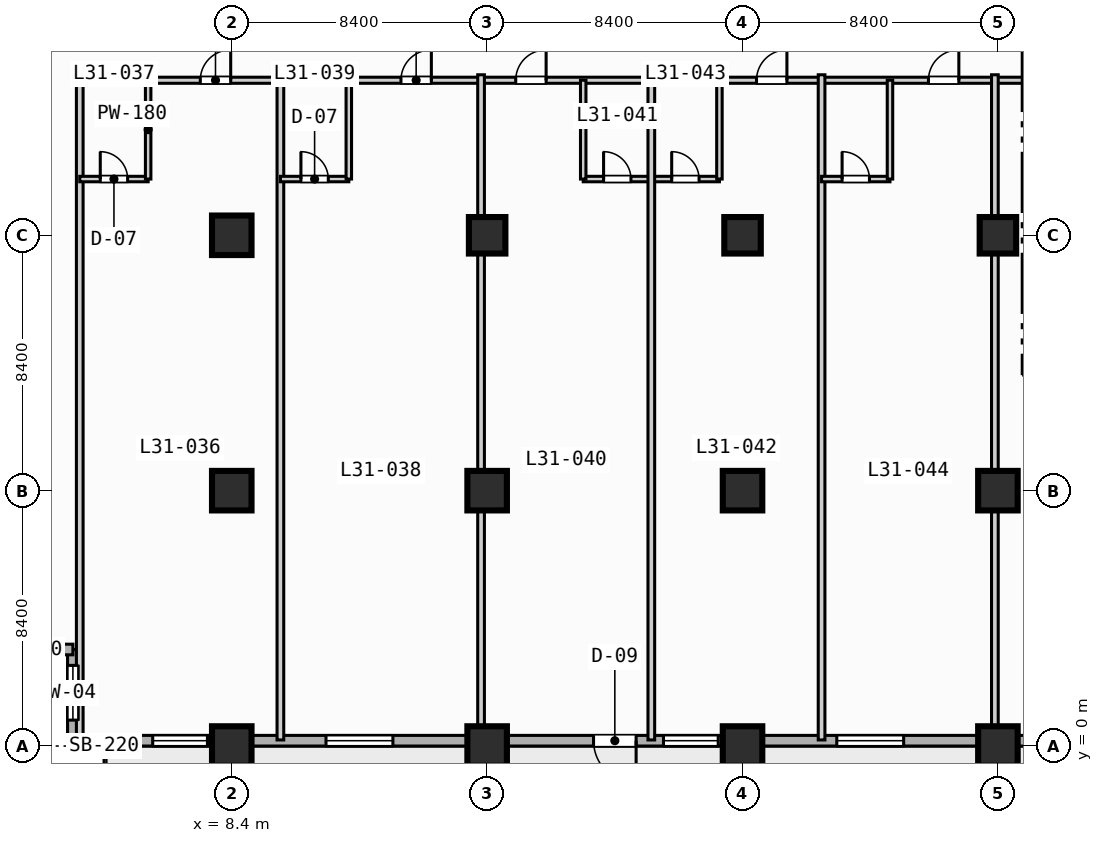
"""IFC4 building model, lengths in metres.
Left out: names, types, materials, properties, quantities, classifications, styles, units other than length and angle.
Written with IfcOpenShell. Run it as: python <this file> out.ifc"""

import sys

from ifc_helpers import new_model, si_unit, direction, frame, frame_2d, origin, origin_2d, place, context, subcontext, project, spatial, rectangle, extrude, element, fill, save


model = new_model("IFC4")
c1 = context("Model", 3, precision=1e-05, world=origin(), true_north=direction((0.0, 1.0)))
c2 = subcontext(c1, "Body", "Model", "MODEL_VIEW")
j1 = project(units=[si_unit("LENGTHUNIT", "METRE"), si_unit("PLANEANGLEUNIT", "RADIAN")], contexts=[c1])
p1 = place(None, origin())
s1 = spatial("IfcSite", under=j1, at=p1, CompositionType="ELEMENT")
p2 = place(p1, origin())
s2 = spatial("IfcBuilding", under=s1, at=p2, CompositionType="ELEMENT")
p3 = place(p2, frame((0.0, 0.0, 130.4)))
s3 = spatial("IfcBuildingStorey", under=s2, at=p3, CompositionType="ELEMENT", Elevation=130.4)
for number, where, z_axis, x_axis in (
    (1, (8.4, 0.0, 0.0), (0.0, 0.0, 1.0), (1.0, 0.0, 0.0)),
    (2, (8.4, 8.4, 0.0), (0.0, 0.0, 1.0), (1.0, 0.0, 0.0)),
    (3, (8.4, 16.8, 0.0), (0.0, 0.0, 1.0), (1.0, 0.0, 0.0)),
    (4, (16.8, 0.0, 0.0), (0.0, 0.0, 1.0), (1.0, 0.0, 0.0)),
    (5, (16.8, 8.4, 0.0), (0.0, 0.0, 1.0), (1.0, 0.0, 0.0)),
):
    element("IfcColumn", number, at=place(p3, frame(where, z_axis=z_axis, x_axis=x_axis)), inside=s3, PredefinedType="COLUMN", context=c2, shape_type="SweptSolid", body=[
        extrude(rectangle(XDim=1.3, YDim=1.3, at=origin_2d()), origin(), (0.0, 0.0, 1.0), 3.8),
    ])
p4 = place(p3, frame((16.8, 16.8, 0.0), z_axis=(0.0, 0.0, 1.0), x_axis=(1.0, 0.0, 0.0)))
e6 = element("IfcColumn", 6, at=p4, inside=s3, PredefinedType="COLUMN", context=c2, shape_type="SweptSolid", body=[
    extrude(rectangle(XDim=1.2, YDim=1.2, at=origin_2d()), origin(), (0.0, 0.0, 1.0), 3.8),
])
for number, where, z_axis, x_axis in (
    (7, (25.2, 0.0, 0.0), (0.0, 0.0, 1.0), (1.0, 0.0, 0.0)),
    (8, (25.2, 8.4, 0.0), (0.0, 0.0, 1.0), (1.0, 0.0, 0.0)),
):
    element("IfcColumn", number, at=place(p3, frame(where, z_axis=z_axis, x_axis=x_axis)), inside=s3, PredefinedType="COLUMN", context=c2, shape_type="SweptSolid", body=[
        extrude(rectangle(XDim=1.3, YDim=1.3, at=origin_2d()), origin(), (0.0, 0.0, 1.0), 3.8),
    ])
p5 = place(p3, frame((25.2, 16.8, 0.0), z_axis=(0.0, 0.0, 1.0), x_axis=(1.0, 0.0, 0.0)))
e9 = element("IfcColumn", 9, at=p5, inside=s3, PredefinedType="COLUMN", context=c2, shape_type="SweptSolid", body=[
    extrude(rectangle(XDim=1.2, YDim=1.2, at=origin_2d()), origin(), (0.0, 0.0, 1.0), 3.8),
])
for number, where, z_axis, x_axis in (
    (10, (33.6, 0.0, 0.0), (0.0, 0.0, 1.0), (1.0, 0.0, 0.0)),
    (11, (33.6, 8.4, 0.0), (0.0, 0.0, 1.0), (1.0, 0.0, 0.0)),
):
    element("IfcColumn", number, at=place(p3, frame(where, z_axis=z_axis, x_axis=x_axis)), inside=s3, PredefinedType="COLUMN", context=c2, shape_type="SweptSolid", body=[
        extrude(rectangle(XDim=1.3, YDim=1.3, at=origin_2d()), origin(), (0.0, 0.0, 1.0), 3.8),
    ])
p6 = place(p3, frame((33.6, 16.8, 0.0), z_axis=(0.0, 0.0, 1.0), x_axis=(1.0, 0.0, 0.0)))
e12 = element("IfcColumn", 12, at=p6, inside=s3, PredefinedType="COLUMN", context=c2, shape_type="SweptSolid", body=[
    extrude(rectangle(XDim=1.2, YDim=1.2, at=origin_2d()), origin(), (0.0, 0.0, 1.0), 3.8),
])
p7 = place(p3, frame((3.175, 0.175, 0.0), z_axis=(0.0, 0.0, 1.0), x_axis=(0.0, 1.0, 0.0)))
e13 = element("IfcWall", 13, at=p7, inside=s3, PredefinedType="STANDARD", context=c2, shape_type="SweptSolid", body=[
    extrude(rectangle(XDim=3.0, YDim=0.35, at=frame_2d((1.5, 0.0))), origin(), (0.0, 0.0, 1.0), 3.55),
])
p8 = place(p7, frame((0.677, 0.0, 0.85)))
e14 = element("IfcOpeningElement", 14, at=p8, cuts=e13, PredefinedType="OPENING", context=c2, shape_type="SweptSolid", body=[
    extrude(rectangle(XDim=1.8, YDim=1.8, at=frame_2d((0.9, 0.9))), frame((0.0, 0.185, 0.0), z_axis=(0.0, -1.0, 0.0), x_axis=(1.0, 0.0, 0.0)), (0.0, 0.0, 1.0), 0.37),
])
p9 = place(p3, frame((3.175, 3.175, 0.0), z_axis=(0.0, 0.0, 1.0), x_axis=(-1.0, 0.0, 0.0)))
e15 = element("IfcWall", 15, at=p9, inside=s3, PredefinedType="STANDARD", context=c2, shape_type="SweptSolid", body=[
    extrude(rectangle(XDim=3.0, YDim=0.35, at=frame_2d((1.5, 0.0))), origin(), (0.0, 0.0, 1.0), 3.55),
])
p10 = place(p3, frame((72.425, 0.175, 0.0), z_axis=(0.0, 0.0, 1.0), x_axis=(-1.0, 0.0, 0.0)))
e16 = element("IfcWall", 16, at=p10, inside=s3, PredefinedType="STANDARD", context=c2, shape_type="SweptSolid", body=[
    extrude(rectangle(XDim=69.25, YDim=0.35, at=frame_2d((34.625, 0.0))), origin(), (0.0, 0.0, 1.0), 3.55),
])
p11 = place(p10, frame((50.725, 0.0, 0.0)))
e17 = element("IfcOpeningElement", 17, at=p11, cuts=e16, PredefinedType="OPENING", context=c2, shape_type="SweptSolid", body=[
    extrude(rectangle(XDim=1.4, YDim=2.2, at=frame_2d((0.7, 1.1))), frame((0.0, 0.185, 0.0), z_axis=(0.0, -1.0, 0.0), x_axis=(1.0, 0.0, 0.0)), (0.0, 0.0, 1.0), 0.37),
])
p12 = place(p10, frame((58.725, 0.0, 0.85)))
e18 = element("IfcOpeningElement", 18, at=p12, cuts=e16, PredefinedType="OPENING", context=c2, shape_type="SweptSolid", body=[
    extrude(rectangle(XDim=2.2, YDim=1.8, at=frame_2d((1.1, 0.9))), frame((0.0, 0.185, 0.0), z_axis=(0.0, -1.0, 0.0), x_axis=(1.0, 0.0, 0.0)), (0.0, 0.0, 1.0), 0.37),
])
p13 = place(p10, frame((41.925, 0.0, 0.85)))
e19 = element("IfcOpeningElement", 19, at=p13, cuts=e16, PredefinedType="OPENING", context=c2, shape_type="SweptSolid", body=[
    extrude(rectangle(XDim=2.2, YDim=1.8, at=frame_2d((1.1, 0.9))), frame((0.0, 0.185, 0.0), z_axis=(0.0, -1.0, 0.0), x_axis=(1.0, 0.0, 0.0)), (0.0, 0.0, 1.0), 0.37),
])
p14 = place(p10, frame((33.525, 0.0, 0.85)))
e20 = element("IfcOpeningElement", 20, at=p14, cuts=e16, PredefinedType="OPENING", context=c2, shape_type="SweptSolid", body=[
    extrude(rectangle(XDim=2.2, YDim=1.8, at=frame_2d((1.1, 0.9))), frame((0.0, 0.185, 0.0), z_axis=(0.0, -1.0, 0.0), x_axis=(1.0, 0.0, 0.0)), (0.0, 0.0, 1.0), 0.37),
])
p15 = place(p10, frame((25.125, 0.0, 0.85)))
e21 = element("IfcOpeningElement", 21, at=p15, cuts=e16, PredefinedType="OPENING", context=c2, shape_type="SweptSolid", body=[
    extrude(rectangle(XDim=2.2, YDim=1.8, at=frame_2d((1.1, 0.9))), frame((0.0, 0.185, 0.0), z_axis=(0.0, -1.0, 0.0), x_axis=(1.0, 0.0, 0.0)), (0.0, 0.0, 1.0), 0.37),
])
p16 = place(p10, frame((64.825, 0.0, 0.85)))
e22 = element("IfcOpeningElement", 22, at=p16, cuts=e16, PredefinedType="OPENING", context=c2, shape_type="SweptSolid", body=[
    extrude(rectangle(XDim=1.8, YDim=1.8, at=frame_2d((0.9, 0.9))), frame((0.0, 0.185, 0.0), z_axis=(0.0, -1.0, 0.0), x_axis=(1.0, 0.0, 0.0)), (0.0, 0.0, 1.0), 0.37),
])
p17 = place(p10, frame((48.025, 0.0, 0.85)))
e23 = element("IfcOpeningElement", 23, at=p17, cuts=e16, PredefinedType="OPENING", context=c2, shape_type="SweptSolid", body=[
    extrude(rectangle(XDim=1.8, YDim=1.8, at=frame_2d((0.9, 0.9))), frame((0.0, 0.185, 0.0), z_axis=(0.0, -1.0, 0.0), x_axis=(1.0, 0.0, 0.0)), (0.0, 0.0, 1.0), 0.37),
])
p18 = place(p3, frame((3.4, 21.9, 0.0), z_axis=(0.0, 0.0, 1.0), x_axis=(1.0, 0.0, 0.0)))
e24 = element("IfcWall", 24, at=p18, inside=s3, PredefinedType="PARTITIONING", context=c2, shape_type="SweptSolid", body=[
    extrude(rectangle(XDim=35.8, YDim=0.2, at=frame_2d((17.9, 0.0))), origin(), (0.0, 0.0, 1.0), 3.55),
])
p19 = place(p18, frame((3.965, 0.0, 0.0)))
e25 = element("IfcOpeningElement", 25, at=p19, cuts=e24, PredefinedType="OPENING", context=c2, shape_type="SweptSolid", body=[
    extrude(rectangle(XDim=1.0, YDim=2.15, at=frame_2d((0.5, 1.075))), frame((0.0, 0.11, 0.0), z_axis=(0.0, -1.0, 0.0), x_axis=(1.0, 0.0, 0.0)), (0.0, 0.0, 1.0), 0.22),
])
p20 = place(p18, frame((10.565, 0.0, 0.0)))
e26 = element("IfcOpeningElement", 26, at=p20, cuts=e24, PredefinedType="OPENING", context=c2, shape_type="SweptSolid", body=[
    extrude(rectangle(XDim=1.0, YDim=2.15, at=frame_2d((0.5, 1.075))), frame((0.0, 0.11, 0.0), z_axis=(0.0, -1.0, 0.0), x_axis=(1.0, 0.0, 0.0)), (0.0, 0.0, 1.0), 0.22),
])
p21 = place(p18, frame((14.34, 0.0, 0.0)))
e27 = element("IfcOpeningElement", 27, at=p21, cuts=e24, PredefinedType="OPENING", context=c2, shape_type="SweptSolid", body=[
    extrude(rectangle(XDim=1.0, YDim=2.15, at=frame_2d((0.5, 1.075))), frame((0.0, 0.11, 0.0), z_axis=(0.0, -1.0, 0.0), x_axis=(1.0, 0.0, 0.0)), (0.0, 0.0, 1.0), 0.22),
])
p22 = place(p18, frame((22.26, 0.0, 0.0)))
e28 = element("IfcOpeningElement", 28, at=p22, cuts=e24, PredefinedType="OPENING", context=c2, shape_type="SweptSolid", body=[
    extrude(rectangle(XDim=1.0, YDim=2.15, at=frame_2d((0.5, 1.075))), frame((0.0, 0.11, 0.0), z_axis=(0.0, -1.0, 0.0), x_axis=(1.0, 0.0, 0.0)), (0.0, 0.0, 1.0), 0.22),
])
p23 = place(p18, frame((27.915, 0.0, 0.0)))
e29 = element("IfcOpeningElement", 29, at=p23, cuts=e24, PredefinedType="OPENING", context=c2, shape_type="SweptSolid", body=[
    extrude(rectangle(XDim=1.0, YDim=2.15, at=frame_2d((0.5, 1.075))), frame((0.0, 0.11, 0.0), z_axis=(0.0, -1.0, 0.0), x_axis=(1.0, 0.0, 0.0)), (0.0, 0.0, 1.0), 0.22),
])
p24 = place(p18, frame((31.285, 0.0, 0.0)))
e30 = element("IfcOpeningElement", 30, at=p24, cuts=e24, PredefinedType="OPENING", context=c2, shape_type="SweptSolid", body=[
    extrude(rectangle(XDim=1.0, YDim=2.15, at=frame_2d((0.5, 1.075))), frame((0.0, 0.11, 0.0), z_axis=(0.0, -1.0, 0.0), x_axis=(1.0, 0.0, 0.0)), (0.0, 0.0, 1.0), 0.22),
])
p25 = place(p3, frame((3.4, 0.2, 0.0), z_axis=(0.0, 0.0, 1.0), x_axis=(0.0, 1.0, 0.0)))
e31 = element("IfcWall", 31, at=p25, inside=s3, PredefinedType="PARTITIONING", context=c2, shape_type="SweptSolid", body=[
    extrude(rectangle(XDim=21.88, YDim=0.22, at=frame_2d((10.94, 0.0))), origin(), (0.0, 0.0, 1.0), 3.55),
])
p26 = place(p3, frame((3.4, 18.65, 0.0), z_axis=(0.0, 0.0, 1.0), x_axis=(1.0, 0.0, 0.0)))
e32 = element("IfcWall", 32, at=p26, inside=s3, PredefinedType="PLUMBINGWALL", context=c2, shape_type="SweptSolid", body=[
    extrude(rectangle(XDim=2.25, YDim=0.18, at=frame_2d((1.125, 0.0))), origin(), (0.0, 0.0, 1.0), 3.55),
])
p27 = place(p26, frame((0.675, 0.0, 0.0)))
e33 = element("IfcOpeningElement", 33, at=p27, cuts=e32, PredefinedType="OPENING", context=c2, shape_type="SweptSolid", body=[
    extrude(rectangle(XDim=0.9, YDim=2.1, at=frame_2d((0.45, 1.05))), frame((0.0, 0.1, 0.0), z_axis=(0.0, -1.0, 0.0), x_axis=(1.0, 0.0, 0.0)), (0.0, 0.0, 1.0), 0.2),
])
p28 = place(p3, frame((5.65, 18.65, 0.0), z_axis=(0.0, 0.0, 1.0), x_axis=(0.0, 1.0, 0.0)))
e34 = element("IfcWall", 34, at=p28, inside=s3, PredefinedType="PLUMBINGWALL", context=c2, shape_type="SweptSolid", body=[
    extrude(rectangle(XDim=3.25, YDim=0.18, at=frame_2d((1.625, 0.0))), origin(), (0.0, 0.0, 1.0), 3.55),
])
p29 = place(p3, frame((10.0, 0.2, 0.0), z_axis=(0.0, 0.0, 1.0), x_axis=(0.0, 1.0, 0.0)))
e35 = element("IfcWall", 35, at=p29, inside=s3, PredefinedType="PARTITIONING", context=c2, shape_type="SweptSolid", body=[
    extrude(rectangle(XDim=21.88, YDim=0.22, at=frame_2d((10.94, 0.0))), origin(), (0.0, 0.0, 1.0), 3.55),
])
p30 = place(p3, frame((10.0, 18.65, 0.0), z_axis=(0.0, 0.0, 1.0), x_axis=(1.0, 0.0, 0.0)))
e36 = element("IfcWall", 36, at=p30, inside=s3, PredefinedType="PLUMBINGWALL", context=c2, shape_type="SweptSolid", body=[
    extrude(rectangle(XDim=2.25, YDim=0.18, at=frame_2d((1.125, 0.0))), origin(), (0.0, 0.0, 1.0), 3.55),
])
p31 = place(p30, frame((0.675, 0.0, 0.0)))
e37 = element("IfcOpeningElement", 37, at=p31, cuts=e36, PredefinedType="OPENING", context=c2, shape_type="SweptSolid", body=[
    extrude(rectangle(XDim=0.9, YDim=2.1, at=frame_2d((0.45, 1.05))), frame((0.0, 0.1, 0.0), z_axis=(0.0, -1.0, 0.0), x_axis=(1.0, 0.0, 0.0)), (0.0, 0.0, 1.0), 0.2),
])
p32 = place(p3, frame((12.25, 18.65, 0.0), z_axis=(0.0, 0.0, 1.0), x_axis=(0.0, 1.0, 0.0)))
e38 = element("IfcWall", 38, at=p32, inside=s3, PredefinedType="PLUMBINGWALL", context=c2, shape_type="SweptSolid", body=[
    extrude(rectangle(XDim=3.25, YDim=0.18, at=frame_2d((1.625, 0.0))), origin(), (0.0, 0.0, 1.0), 3.55),
])
p33 = place(p3, frame((16.6, 0.2, 0.0), z_axis=(0.0, 0.0, 1.0), x_axis=(0.0, 1.0, 0.0)))
e39 = element("IfcWall", 39, at=p33, inside=s3, PredefinedType="PARTITIONING", context=c2, shape_type="SweptSolid", body=[
    extrude(rectangle(XDim=21.88, YDim=0.22, at=frame_2d((10.94, 0.0))), origin(), (0.0, 0.0, 1.0), 2.8),
])
p34 = place(p3, frame((19.96, 18.65, 0.0), z_axis=(0.0, 0.0, 1.0), x_axis=(1.0, 0.0, 0.0)))
e40 = element("IfcWall", 40, at=p34, inside=s3, PredefinedType="PLUMBINGWALL", context=c2, shape_type="SweptSolid", body=[
    extrude(rectangle(XDim=4.48, YDim=0.18, at=frame_2d((2.24, 0.0))), origin(), (0.0, 0.0, 1.0), 3.55),
])
p35 = place(p34, frame((0.67, 0.0, 0.0)))
e41 = element("IfcOpeningElement", 41, at=p35, cuts=e40, PredefinedType="OPENING", context=c2, shape_type="SweptSolid", body=[
    extrude(rectangle(XDim=0.9, YDim=2.1, at=frame_2d((0.45, 1.05))), frame((0.0, 0.1, 0.0), z_axis=(0.0, -1.0, 0.0), x_axis=(1.0, 0.0, 0.0)), (0.0, 0.0, 1.0), 0.2),
])
p36 = place(p34, frame((2.91, 0.0, 0.0)))
e42 = element("IfcOpeningElement", 42, at=p36, cuts=e40, PredefinedType="OPENING", context=c2, shape_type="SweptSolid", body=[
    extrude(rectangle(XDim=0.9, YDim=2.1, at=frame_2d((0.45, 1.05))), frame((0.0, 0.1, 0.0), z_axis=(0.0, -1.0, 0.0), x_axis=(1.0, 0.0, 0.0)), (0.0, 0.0, 1.0), 0.2),
])
p37 = place(p3, frame((19.96, 18.65, 0.0), z_axis=(0.0, 0.0, 1.0), x_axis=(0.0, 1.0, 0.0)))
e43 = element("IfcWall", 43, at=p37, inside=s3, PredefinedType="PLUMBINGWALL", context=c2, shape_type="SweptSolid", body=[
    extrude(rectangle(XDim=3.25, YDim=0.18, at=frame_2d((1.625, 0.0))), origin(), (0.0, 0.0, 1.0), 3.55),
])
p38 = place(p3, frame((22.2, 0.2, 0.0), z_axis=(0.0, 0.0, 1.0), x_axis=(0.0, 1.0, 0.0)))
e44 = element("IfcWall", 44, at=p38, inside=s3, PredefinedType="PARTITIONING", context=c2, shape_type="SweptSolid", body=[
    extrude(rectangle(XDim=21.88, YDim=0.22, at=frame_2d((10.94, 0.0))), origin(), (0.0, 0.0, 1.0), 3.55),
])
p39 = place(p3, frame((24.44, 18.65, 0.0), z_axis=(0.0, 0.0, 1.0), x_axis=(0.0, 1.0, 0.0)))
e45 = element("IfcWall", 45, at=p39, inside=s3, PredefinedType="PLUMBINGWALL", context=c2, shape_type="SweptSolid", body=[
    extrude(rectangle(XDim=3.25, YDim=0.18, at=frame_2d((1.625, 0.0))), origin(), (0.0, 0.0, 1.0), 3.55),
])
p40 = place(p3, frame((27.8, 0.2, 0.0), z_axis=(0.0, 0.0, 1.0), x_axis=(0.0, 1.0, 0.0)))
e46 = element("IfcWall", 46, at=p40, inside=s3, PredefinedType="PARTITIONING", context=c2, shape_type="SweptSolid", body=[
    extrude(rectangle(XDim=21.88, YDim=0.22, at=frame_2d((10.94, 0.0))), origin(), (0.0, 0.0, 1.0), 3.55),
])
p41 = place(p3, frame((27.8, 18.65, 0.0), z_axis=(0.0, 0.0, 1.0), x_axis=(1.0, 0.0, 0.0)))
e47 = element("IfcWall", 47, at=p41, inside=s3, PredefinedType="PLUMBINGWALL", context=c2, shape_type="SweptSolid", body=[
    extrude(rectangle(XDim=2.25, YDim=0.18, at=frame_2d((1.125, 0.0))), origin(), (0.0, 0.0, 1.0), 3.55),
])
p42 = place(p41, frame((0.675, 0.0, 0.0)))
e48 = element("IfcOpeningElement", 48, at=p42, cuts=e47, PredefinedType="OPENING", context=c2, shape_type="SweptSolid", body=[
    extrude(rectangle(XDim=0.9, YDim=2.1, at=frame_2d((0.45, 1.05))), frame((0.0, 0.1, 0.0), z_axis=(0.0, -1.0, 0.0), x_axis=(1.0, 0.0, 0.0)), (0.0, 0.0, 1.0), 0.2),
])
p43 = place(p3, frame((30.05, 18.65, 0.0), z_axis=(0.0, 0.0, 1.0), x_axis=(0.0, 1.0, 0.0)))
e49 = element("IfcWall", 49, at=p43, inside=s3, PredefinedType="PLUMBINGWALL", context=c2, shape_type="SweptSolid", body=[
    extrude(rectangle(XDim=3.25, YDim=0.18, at=frame_2d((1.625, 0.0))), origin(), (0.0, 0.0, 1.0), 3.55),
])
p44 = place(p3, frame((33.5, 0.2, 0.0), z_axis=(0.0, 0.0, 1.0), x_axis=(0.0, 1.0, 0.0)))
e50 = element("IfcWall", 50, at=p44, inside=s3, PredefinedType="PARTITIONING", context=c2, shape_type="SweptSolid", body=[
    extrude(rectangle(XDim=21.88, YDim=0.22, at=frame_2d((10.94, 0.0))), origin(), (0.0, 0.0, 1.0), 2.8),
])
p45 = place(p8, origin())
e51 = element("IfcWindow", 51, at=p45, inside=s3, PartitioningType="SINGLE_PANEL", PredefinedType="WINDOW", context=c2, shape_type="SweptSolid", body=[
    extrude(rectangle(XDim=1.8, YDim=1.8, at=frame_2d((0.9, 0.9))), frame((0.0, 0.03, 0.0), z_axis=(0.0, -1.0, 0.0), x_axis=(1.0, 0.0, 0.0)), (0.0, 0.0, 1.0), 0.06),
])
fill(e14, e51)
p46 = place(p11, origin())
e52 = element("IfcDoor", 52, at=p46, inside=s3, OperationType="SINGLE_SWING_LEFT", PredefinedType="DOOR", context=c2, shape_type="SweptSolid", body=[
    extrude(rectangle(XDim=1.4, YDim=2.2, at=frame_2d((0.7, 1.1))), frame((0.0, 0.025, 0.0), z_axis=(0.0, -1.0, 0.0), x_axis=(1.0, 0.0, 0.0)), (0.0, 0.0, 1.0), 0.05),
])
fill(e17, e52)
p47 = place(p12, origin())
e53 = element("IfcWindow", 53, at=p47, inside=s3, PartitioningType="SINGLE_PANEL", PredefinedType="WINDOW", context=c2, shape_type="SweptSolid", body=[
    extrude(rectangle(XDim=2.2, YDim=1.8, at=frame_2d((1.1, 0.9))), frame((0.0, 0.03, 0.0), z_axis=(0.0, -1.0, 0.0), x_axis=(1.0, 0.0, 0.0)), (0.0, 0.0, 1.0), 0.06),
])
fill(e18, e53)
p48 = place(p13, origin())
e54 = element("IfcWindow", 54, at=p48, inside=s3, PartitioningType="SINGLE_PANEL", PredefinedType="WINDOW", context=c2, shape_type="SweptSolid", body=[
    extrude(rectangle(XDim=2.2, YDim=1.8, at=frame_2d((1.1, 0.9))), frame((0.0, 0.03, 0.0), z_axis=(0.0, -1.0, 0.0), x_axis=(1.0, 0.0, 0.0)), (0.0, 0.0, 1.0), 0.06),
])
fill(e19, e54)
p49 = place(p16, origin())
e55 = element("IfcWindow", 55, at=p49, inside=s3, PartitioningType="SINGLE_PANEL", PredefinedType="WINDOW", context=c2, shape_type="SweptSolid", body=[
    extrude(rectangle(XDim=1.8, YDim=1.8, at=frame_2d((0.9, 0.9))), frame((0.0, 0.03, 0.0), z_axis=(0.0, -1.0, 0.0), x_axis=(1.0, 0.0, 0.0)), (0.0, 0.0, 1.0), 0.06),
])
fill(e22, e55)
p50 = place(p17, origin())
e56 = element("IfcWindow", 56, at=p50, inside=s3, PartitioningType="SINGLE_PANEL", PredefinedType="WINDOW", context=c2, shape_type="SweptSolid", body=[
    extrude(rectangle(XDim=1.8, YDim=1.8, at=frame_2d((0.9, 0.9))), frame((0.0, 0.03, 0.0), z_axis=(0.0, -1.0, 0.0), x_axis=(1.0, 0.0, 0.0)), (0.0, 0.0, 1.0), 0.06),
])
fill(e23, e56)
p51 = place(p19, origin())
e57 = element("IfcDoor", 57, at=p51, inside=s3, OperationType="SINGLE_SWING_RIGHT", PredefinedType="DOOR", context=c2, shape_type="SweptSolid", body=[
    extrude(rectangle(XDim=1.0, YDim=2.15, at=frame_2d((0.5, 1.075))), frame((0.0, 0.025, 0.0), z_axis=(0.0, -1.0, 0.0), x_axis=(1.0, 0.0, 0.0)), (0.0, 0.0, 1.0), 0.05),
])
fill(e25, e57)
p52 = place(p20, origin())
e58 = element("IfcDoor", 58, at=p52, inside=s3, OperationType="SINGLE_SWING_RIGHT", PredefinedType="DOOR", context=c2, shape_type="SweptSolid", body=[
    extrude(rectangle(XDim=1.0, YDim=2.15, at=frame_2d((0.5, 1.075))), frame((0.0, 0.025, 0.0), z_axis=(0.0, -1.0, 0.0), x_axis=(1.0, 0.0, 0.0)), (0.0, 0.0, 1.0), 0.05),
])
fill(e26, e58)
p53 = place(p21, origin())
e59 = element("IfcDoor", 59, at=p53, inside=s3, OperationType="SINGLE_SWING_RIGHT", PredefinedType="DOOR", context=c2, shape_type="SweptSolid", body=[
    extrude(rectangle(XDim=1.0, YDim=2.15, at=frame_2d((0.5, 1.075))), frame((0.0, 0.025, 0.0), z_axis=(0.0, -1.0, 0.0), x_axis=(1.0, 0.0, 0.0)), (0.0, 0.0, 1.0), 0.05),
])
fill(e27, e59)
p54 = place(p22, origin())
e60 = element("IfcDoor", 60, at=p54, inside=s3, OperationType="SINGLE_SWING_RIGHT", PredefinedType="DOOR", context=c2, shape_type="SweptSolid", body=[
    extrude(rectangle(XDim=1.0, YDim=2.15, at=frame_2d((0.5, 1.075))), frame((0.0, 0.025, 0.0), z_axis=(0.0, -1.0, 0.0), x_axis=(1.0, 0.0, 0.0)), (0.0, 0.0, 1.0), 0.05),
])
fill(e28, e60)
p55 = place(p23, origin())
e61 = element("IfcDoor", 61, at=p55, inside=s3, OperationType="SINGLE_SWING_RIGHT", PredefinedType="DOOR", context=c2, shape_type="SweptSolid", body=[
    extrude(rectangle(XDim=1.0, YDim=2.15, at=frame_2d((0.5, 1.075))), frame((0.0, 0.025, 0.0), z_axis=(0.0, -1.0, 0.0), x_axis=(1.0, 0.0, 0.0)), (0.0, 0.0, 1.0), 0.05),
])
fill(e29, e61)
p56 = place(p27, origin())
e62 = element("IfcDoor", 62, at=p56, inside=s3, OperationType="SINGLE_SWING_LEFT", PredefinedType="DOOR", context=c2, shape_type="SweptSolid", body=[
    extrude(rectangle(XDim=0.9, YDim=2.1, at=frame_2d((0.45, 1.05))), frame((0.0, 0.025, 0.0), z_axis=(0.0, -1.0, 0.0), x_axis=(1.0, 0.0, 0.0)), (0.0, 0.0, 1.0), 0.05),
])
fill(e33, e62)
p57 = place(p31, origin())
e63 = element("IfcDoor", 63, at=p57, inside=s3, OperationType="SINGLE_SWING_LEFT", PredefinedType="DOOR", context=c2, shape_type="SweptSolid", body=[
    extrude(rectangle(XDim=0.9, YDim=2.1, at=frame_2d((0.45, 1.05))), frame((0.0, 0.025, 0.0), z_axis=(0.0, -1.0, 0.0), x_axis=(1.0, 0.0, 0.0)), (0.0, 0.0, 1.0), 0.05),
])
fill(e37, e63)
p58 = place(p35, origin())
e64 = element("IfcDoor", 64, at=p58, inside=s3, OperationType="SINGLE_SWING_LEFT", PredefinedType="DOOR", context=c2, shape_type="SweptSolid", body=[
    extrude(rectangle(XDim=0.9, YDim=2.1, at=frame_2d((0.45, 1.05))), frame((0.0, 0.025, 0.0), z_axis=(0.0, -1.0, 0.0), x_axis=(1.0, 0.0, 0.0)), (0.0, 0.0, 1.0), 0.05),
])
fill(e41, e64)
p59 = place(p36, origin())
e65 = element("IfcDoor", 65, at=p59, inside=s3, OperationType="SINGLE_SWING_LEFT", PredefinedType="DOOR", context=c2, shape_type="SweptSolid", body=[
    extrude(rectangle(XDim=0.9, YDim=2.1, at=frame_2d((0.45, 1.05))), frame((0.0, 0.025, 0.0), z_axis=(0.0, -1.0, 0.0), x_axis=(1.0, 0.0, 0.0)), (0.0, 0.0, 1.0), 0.05),
])
fill(e42, e65)
p60 = place(p42, origin())
e66 = element("IfcDoor", 66, at=p60, inside=s3, OperationType="SINGLE_SWING_LEFT", PredefinedType="DOOR", context=c2, shape_type="SweptSolid", body=[
    extrude(rectangle(XDim=0.9, YDim=2.1, at=frame_2d((0.45, 1.05))), frame((0.0, 0.025, 0.0), z_axis=(0.0, -1.0, 0.0), x_axis=(1.0, 0.0, 0.0)), (0.0, 0.0, 1.0), 0.05),
])
fill(e48, e66)
save(model, sys.argv[1])
